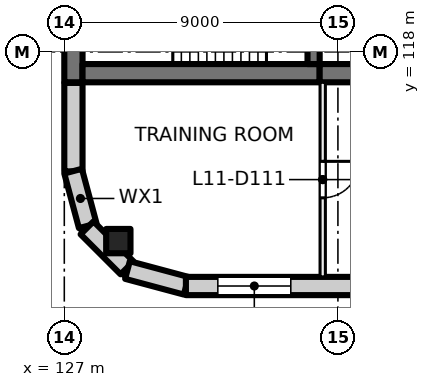
"""IFC4 building model, lengths in metres.
Left out: names, types, materials, properties, quantities, classifications, styles, units other than length and angle.
Written with IfcOpenShell. Run it as: python <this file> out.ifc"""

import sys

from ifc_helpers import new_model, si_unit, direction, frame, frame_2d, origin, origin_2d, place, context, subcontext, project, spatial, rectangle, extrude, element, fill, save


model = new_model("IFC4")
c1 = context("Model", 3, precision=1e-05, world=origin(), true_north=direction((0.0, 1.0)))
c2 = subcontext(c1, "Body", "Model", "MODEL_VIEW")
j1 = project(units=[si_unit("LENGTHUNIT", "METRE"), si_unit("PLANEANGLEUNIT", "RADIAN")], contexts=[c1])
p1 = place(None, origin())
s1 = spatial("IfcSite", under=j1, at=p1, CompositionType="ELEMENT")
p2 = place(p1, origin())
s2 = spatial("IfcBuilding", under=s1, at=p2, CompositionType="ELEMENT")
p3 = place(p2, frame((0.0, 0.0, 51.5)))
s3 = spatial("IfcBuildingStorey", under=s2, at=p3, CompositionType="ELEMENT", Elevation=51.5)
p4 = place(p3, frame((128.777, 111.777, 0.0), z_axis=(0.0, 0.0, 1.0), x_axis=(1.0, 0.0, 0.0)))
e1 = element("IfcColumn", 1, at=p4, inside=s3, PredefinedType="COLUMN", context=c2, shape_type="SweptSolid", body=[
    extrude(rectangle(XDim=0.8, YDim=0.8, at=origin_2d()), origin(), (0.0, 0.0, 1.0), 4.0),
])
p5 = place(p3, frame((127.3, 117.0, 0.0), z_axis=(0.0, 0.0, 1.0), x_axis=(0.0, 1.0, 0.0)))
e2 = element("IfcWall", 2, at=p5, inside=s3, PredefinedType="SHEAR", context=c2, shape_type="SweptSolid", body=[
    extrude(rectangle(XDim=3.8, YDim=0.6, at=frame_2d((1.9, 0.0))), origin(), (0.0, 0.0, 1.0), 4.0),
])
p6 = place(p3, frame((127.6, 117.3, 0.0), z_axis=(0.0, 0.0, 1.0), x_axis=(1.0, 0.0, 0.0)))
e3 = element("IfcWall", 3, at=p6, inside=s3, PredefinedType="SHEAR", context=c2, shape_type="SweptSolid", body=[
    extrude(rectangle(XDim=7.8, YDim=0.6, at=frame_2d((3.9, 0.0))), origin(), (0.0, 0.0, 1.0), 4.0),
])
p7 = place(p3, frame((135.4, 117.3, 0.0), z_axis=(0.0, 0.0, 1.0), x_axis=(1.0, 0.0, 0.0)))
e4 = element("IfcWall", 4, at=p7, inside=s3, PredefinedType="SHEAR", context=c2, shape_type="SweptSolid", body=[
    extrude(rectangle(XDim=4.6, YDim=0.6, at=frame_2d((2.3, 0.0))), origin(), (0.0, 0.0, 1.0), 4.0),
])
p8 = place(p3, frame((135.2, 117.6, 0.0), z_axis=(0.0, 0.0, 1.0), x_axis=(0.0, 1.0, 0.0)))
e5 = element("IfcWall", 5, at=p8, inside=s3, PredefinedType="SHEAR", context=c2, shape_type="SweptSolid", body=[
    extrude(rectangle(XDim=2.8, YDim=0.4, at=frame_2d((1.4, 0.0))), origin(), (0.0, 0.0, 1.0), 4.0),
])
p9 = place(p8, frame((0.9, 0.0, 0.0)))
e6 = element("IfcOpeningElement", 6, at=p9, cuts=e5, PredefinedType="OPENING", context=c2, shape_type="SweptSolid", body=[
    extrude(rectangle(XDim=1.0, YDim=2.1, at=frame_2d((0.5, 1.05))), frame((0.0, 0.21, 0.0), z_axis=(0.0, -1.0, 0.0), x_axis=(1.0, 0.0, 0.0)), (0.0, 0.0, 1.0), 0.42),
])
p10 = place(p3, frame((127.3, 114.07, 0.0), z_axis=(0.0, 0.0, 1.0), x_axis=(0.0, 1.0, 0.0)))
e7 = element("IfcWall", 7, at=p10, inside=s3, PredefinedType="SOLIDWALL", context=c2, shape_type="SweptSolid", body=[
    extrude(rectangle(XDim=2.91, YDim=0.6, at=frame_2d((1.455, 0.0))), origin(), (0.0, 0.0, 1.0), 3.625),
])
for number, where, z_axis, x_axis in (
    (8, (127.771, 112.281, 0.0), (0.0, 0.0, 1.0), (-0.259, 0.966, 0.0)),
    (9, (129.064, 110.896, 0.0), (0.0, 0.0, 1.0), (-0.707, 0.707, 0.0)),
):
    element("IfcWall", number, at=place(p3, frame(where, z_axis=z_axis, x_axis=x_axis)), inside=s3, PredefinedType="SOLIDWALL", context=c2, shape_type="SweptSolid", body=[
        extrude(rectangle(XDim=1.861, YDim=0.6, at=frame_2d((0.93, 0.0))), origin(), (0.0, 0.0, 1.0), 3.625),
    ])
p11 = place(p3, frame((131.01, 110.308, 0.0), z_axis=(0.0, 0.0, 1.0), x_axis=(-0.965920269068, 0.258839784042, 0.0)))
e10 = element("IfcWall", 10, at=p11, inside=s3, PredefinedType="SOLIDWALL", context=c2, shape_type="SweptSolid", body=[
    extrude(rectangle(XDim=2.0, YDim=0.6, at=frame_2d((1.0, 0.0))), origin(), (0.0, 0.0, 1.0), 3.625),
])
p12 = place(p3, frame((162.93, 110.3, 0.0), z_axis=(0.0, 0.0, 1.0), x_axis=(-1.0, 0.0, 0.0)))
e11 = element("IfcWall", 11, at=p12, inside=s3, PredefinedType="SOLIDWALL", context=c2, shape_type="SweptSolid", body=[
    extrude(rectangle(XDim=31.93, YDim=0.6, at=frame_2d((15.965, 0.0))), origin(), (0.0, 0.0, 1.0), 3.625),
])
p13 = place(p12, frame((1.48, 0.0, 0.9)))
e12 = element("IfcOpeningElement", 12, at=p13, cuts=e11, PredefinedType="OPENING", context=c2, shape_type="SweptSolid", body=[
    extrude(rectangle(XDim=2.4, YDim=2.4, at=frame_2d((1.2, 1.2))), frame((0.0, 0.31, 0.0), z_axis=(0.0, -1.0, 0.0), x_axis=(1.0, 0.0, 0.0)), (0.0, 0.0, 1.0), 0.62),
])
p14 = place(p12, frame((5.98, 0.0, 0.9)))
e13 = element("IfcOpeningElement", 13, at=p14, cuts=e11, PredefinedType="OPENING", context=c2, shape_type="SweptSolid", body=[
    extrude(rectangle(XDim=2.4, YDim=2.4, at=frame_2d((1.2, 1.2))), frame((0.0, 0.31, 0.0), z_axis=(0.0, -1.0, 0.0), x_axis=(1.0, 0.0, 0.0)), (0.0, 0.0, 1.0), 0.62),
])
p15 = place(p12, frame((10.48, 0.0, 0.9)))
e14 = element("IfcOpeningElement", 14, at=p15, cuts=e11, PredefinedType="OPENING", context=c2, shape_type="SweptSolid", body=[
    extrude(rectangle(XDim=2.4, YDim=2.4, at=frame_2d((1.2, 1.2))), frame((0.0, 0.31, 0.0), z_axis=(0.0, -1.0, 0.0), x_axis=(1.0, 0.0, 0.0)), (0.0, 0.0, 1.0), 0.62),
])
p16 = place(p12, frame((14.98, 0.0, 0.9)))
e15 = element("IfcOpeningElement", 15, at=p16, cuts=e11, PredefinedType="OPENING", context=c2, shape_type="SweptSolid", body=[
    extrude(rectangle(XDim=2.4, YDim=2.4, at=frame_2d((1.2, 1.2))), frame((0.0, 0.31, 0.0), z_axis=(0.0, -1.0, 0.0), x_axis=(1.0, 0.0, 0.0)), (0.0, 0.0, 1.0), 0.62),
])
p17 = place(p12, frame((19.48, 0.0, 0.9)))
e16 = element("IfcOpeningElement", 16, at=p17, cuts=e11, PredefinedType="OPENING", context=c2, shape_type="SweptSolid", body=[
    extrude(rectangle(XDim=2.4, YDim=2.4, at=frame_2d((1.2, 1.2))), frame((0.0, 0.31, 0.0), z_axis=(0.0, -1.0, 0.0), x_axis=(1.0, 0.0, 0.0)), (0.0, 0.0, 1.0), 0.62),
])
p18 = place(p12, frame((23.98, 0.0, 0.9)))
e17 = element("IfcOpeningElement", 17, at=p18, cuts=e11, PredefinedType="OPENING", context=c2, shape_type="SweptSolid", body=[
    extrude(rectangle(XDim=2.4, YDim=2.4, at=frame_2d((1.2, 1.2))), frame((0.0, 0.31, 0.0), z_axis=(0.0, -1.0, 0.0), x_axis=(1.0, 0.0, 0.0)), (0.0, 0.0, 1.0), 0.62),
])
p19 = place(p12, frame((28.48, 0.0, 0.9)))
e18 = element("IfcOpeningElement", 18, at=p19, cuts=e11, PredefinedType="OPENING", context=c2, shape_type="SweptSolid", body=[
    extrude(rectangle(XDim=2.4, YDim=2.4, at=frame_2d((1.2, 1.2))), frame((0.0, 0.31, 0.0), z_axis=(0.0, -1.0, 0.0), x_axis=(1.0, 0.0, 0.0)), (0.0, 0.0, 1.0), 0.62),
])
p20 = place(p3, frame((135.5, 117.0, 0.0), z_axis=(0.0, 0.0, 1.0), x_axis=(0.0, -1.0, 0.0)))
e19 = element("IfcWall", 19, at=p20, inside=s3, PredefinedType="PARTITIONING", context=c2, shape_type="SweptSolid", body=[
    extrude(rectangle(XDim=6.4, YDim=0.175, at=frame_2d((3.2, 0.0))), origin(), (0.0, 0.0, 1.0), 3.625),
])
p21 = place(p20, frame((2.6, 0.0, 0.0)))
e20 = element("IfcOpeningElement", 20, at=p21, cuts=e19, PredefinedType="OPENING", context=c2, shape_type="SweptSolid", body=[
    extrude(rectangle(XDim=1.2, YDim=2.1, at=frame_2d((0.6, 1.05))), frame((0.0, 0.097, 0.0), z_axis=(0.0, -1.0, 0.0), x_axis=(1.0, 0.0, 0.0)), (0.0, 0.0, 1.0), 0.195),
])
p22 = place(p19, origin())
e21 = element("IfcWindow", 21, at=p22, inside=s3, PartitioningType="SINGLE_PANEL", PredefinedType="WINDOW", context=c2, shape_type="SweptSolid", body=[
    extrude(rectangle(XDim=2.4, YDim=2.4, at=frame_2d((1.2, 1.2))), frame((0.0, 0.03, 0.0), z_axis=(0.0, -1.0, 0.0), x_axis=(1.0, 0.0, 0.0)), (0.0, 0.0, 1.0), 0.06),
])
fill(e18, e21)
p23 = place(p21, origin())
e22 = element("IfcDoor", 22, at=p23, inside=s3, OperationType="DOUBLE_DOOR_SINGLE_SWING", PredefinedType="DOOR", context=c2, shape_type="SweptSolid", body=[
    extrude(rectangle(XDim=1.2, YDim=2.1, at=frame_2d((0.6, 1.05))), frame((0.0, 0.025, 0.0), z_axis=(0.0, -1.0, 0.0), x_axis=(1.0, 0.0, 0.0)), (0.0, 0.0, 1.0), 0.05),
])
fill(e20, e22)
save(model, sys.argv[1])
